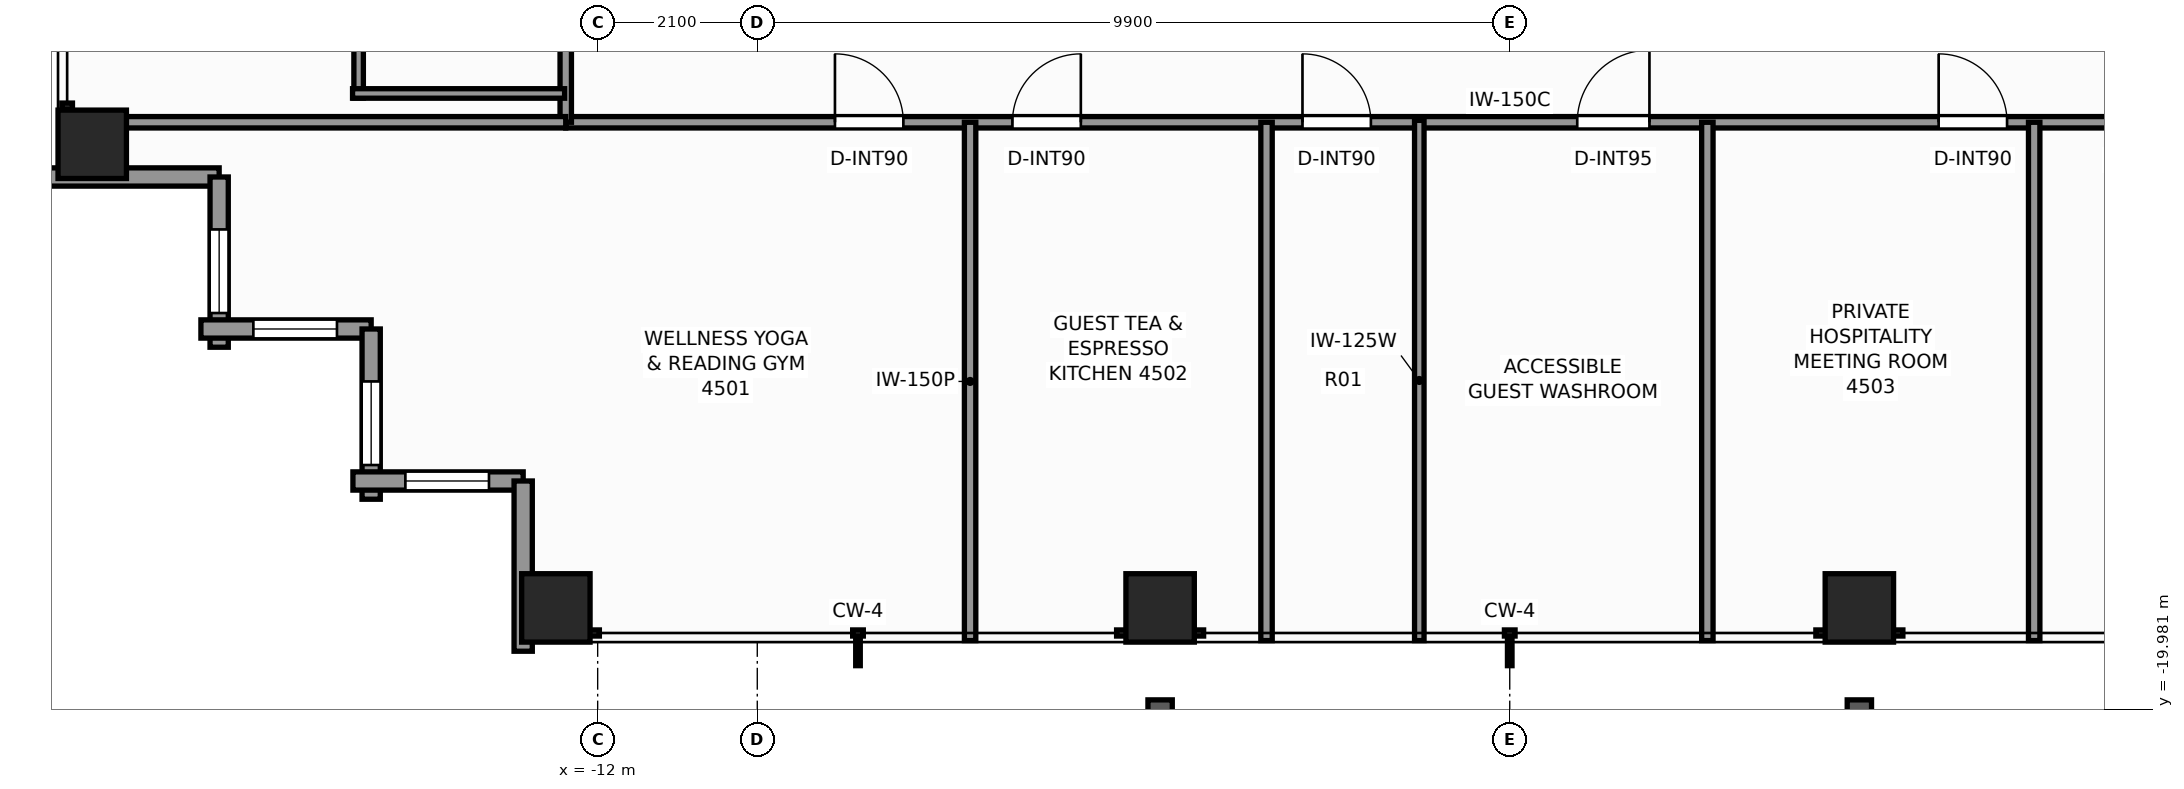
"""IFC4 building model, lengths in metres.
Left out: names, types, materials, properties, quantities, classifications, styles, units other than length and angle.
Written with IfcOpenShell. Run it as: python <this file> out.ifc"""

import sys

from ifc_helpers import new_model, si_unit, direction, frame, frame_2d, origin, origin_2d, place, context, subcontext, project, spatial, rectangle, extrude, element, fill, save


model = new_model("IFC4")
c1 = context("Model", 3, precision=1e-05, world=origin(), true_north=direction((0.0, 1.0)))
c2 = subcontext(c1, "Body", "Model", "MODEL_VIEW")
j1 = project(units=[si_unit("LENGTHUNIT", "METRE"), si_unit("PLANEANGLEUNIT", "RADIAN")], contexts=[c1])
p1 = place(None, origin())
s1 = spatial("IfcSite", under=j1, at=p1, CompositionType="ELEMENT")
p2 = place(p1, origin())
s2 = spatial("IfcBuilding", under=s1, at=p2, CompositionType="ELEMENT")
p3 = place(p2, frame((0.0, 0.0, 156.9)))
s3 = spatial("IfcBuildingStorey", under=s2, at=p3, CompositionType="ELEMENT", Elevation=156.9)
for number, where, z_axis, x_axis in (
    (1, (-12.55, -18.65, 0.0), (0.0, 0.0, 1.0), (1.0, 0.0, 0.0)),
    (2, (-4.6, -18.65, 0.0), (0.0, 0.0, 1.0), (1.0, 0.0, 0.0)),
    (3, (4.6, -18.65, 0.0), (0.0, 0.0, 1.0), (1.0, 0.0, 0.0)),
    (4, (-18.65, -12.55, 0.0), (0.0, 0.0, 1.0), (1.0, 0.0, 0.0)),
):
    element("IfcColumn", number, at=place(p3, frame(where, z_axis=z_axis, x_axis=x_axis)), inside=s3, PredefinedType="COLUMN", context=c2, shape_type="SweptSolid", body=[
        extrude(rectangle(XDim=0.9, YDim=0.9, at=origin_2d()), origin(), (0.0, 0.0, 1.0), 3.3),
    ])
p4 = place(p3, frame((-16.98, -12.98, 0.0), z_axis=(0.0, 0.0, 1.0), x_axis=(-1.0, 0.0, 0.0)))
e5 = element("IfcWall", 5, at=p4, inside=s3, PredefinedType="STANDARD", context=c2, shape_type="SweptSolid", body=[
    extrude(rectangle(XDim=2.24, YDim=0.24, at=frame_2d((1.12, 0.0))), origin(), (0.0, 0.0, 1.0), 2.483),
])
p5 = place(p3, frame((-16.98, -15.22, 0.0), z_axis=(0.0, 0.0, 1.0), x_axis=(0.0, 1.0, 0.0)))
e6 = element("IfcWall", 6, at=p5, inside=s3, PredefinedType="STANDARD", context=c2, shape_type="SweptSolid", body=[
    extrude(rectangle(XDim=2.24, YDim=0.24, at=frame_2d((1.12, 0.0))), origin(), (0.0, 0.0, 1.0), 2.483),
])
p6 = place(p5, frame((0.45, 0.0, 0.65)))
e7 = element("IfcOpeningElement", 7, at=p6, cuts=e6, PredefinedType="OPENING", context=c2, shape_type="SweptSolid", body=[
    extrude(rectangle(XDim=1.1, YDim=1.45, at=frame_2d((0.55, 0.725))), frame((0.0, 0.13, 0.0), z_axis=(0.0, -1.0, 0.0), x_axis=(1.0, 0.0, 0.0)), (0.0, 0.0, 1.0), 0.26),
])
p7 = place(p3, frame((-14.98, -14.98, 0.0), z_axis=(0.0, 0.0, 1.0), x_axis=(-1.0, 0.0, 0.0)))
e8 = element("IfcWall", 8, at=p7, inside=s3, PredefinedType="STANDARD", context=c2, shape_type="SweptSolid", body=[
    extrude(rectangle(XDim=2.24, YDim=0.24, at=frame_2d((1.12, 0.0))), origin(), (0.0, 0.0, 1.0), 2.483),
])
p8 = place(p7, frame((0.45, 0.0, 0.65)))
e9 = element("IfcOpeningElement", 9, at=p8, cuts=e8, PredefinedType="OPENING", context=c2, shape_type="SweptSolid", body=[
    extrude(rectangle(XDim=1.1, YDim=1.45, at=frame_2d((0.55, 0.725))), frame((0.0, 0.13, 0.0), z_axis=(0.0, -1.0, 0.0), x_axis=(1.0, 0.0, 0.0)), (0.0, 0.0, 1.0), 0.26),
])
p9 = place(p3, frame((-14.98, -17.22, 0.0), z_axis=(0.0, 0.0, 1.0), x_axis=(0.0, 1.0, 0.0)))
e10 = element("IfcWall", 10, at=p9, inside=s3, PredefinedType="STANDARD", context=c2, shape_type="SweptSolid", body=[
    extrude(rectangle(XDim=2.24, YDim=0.24, at=frame_2d((1.12, 0.0))), origin(), (0.0, 0.0, 1.0), 2.483),
])
p10 = place(p9, frame((0.45, 0.0, 0.65)))
e11 = element("IfcOpeningElement", 11, at=p10, cuts=e10, PredefinedType="OPENING", context=c2, shape_type="SweptSolid", body=[
    extrude(rectangle(XDim=1.1, YDim=1.45, at=frame_2d((0.55, 0.725))), frame((0.0, 0.13, 0.0), z_axis=(0.0, -1.0, 0.0), x_axis=(1.0, 0.0, 0.0)), (0.0, 0.0, 1.0), 0.26),
])
p11 = place(p3, frame((-12.98, -16.98, 0.0), z_axis=(0.0, 0.0, 1.0), x_axis=(-1.0, 0.0, 0.0)))
e12 = element("IfcWall", 12, at=p11, inside=s3, PredefinedType="STANDARD", context=c2, shape_type="SweptSolid", body=[
    extrude(rectangle(XDim=2.24, YDim=0.24, at=frame_2d((1.12, 0.0))), origin(), (0.0, 0.0, 1.0), 2.483),
])
p12 = place(p11, frame((0.45, 0.0, 0.65)))
e13 = element("IfcOpeningElement", 13, at=p12, cuts=e12, PredefinedType="OPENING", context=c2, shape_type="SweptSolid", body=[
    extrude(rectangle(XDim=1.1, YDim=1.45, at=frame_2d((0.55, 0.725))), frame((0.0, 0.13, 0.0), z_axis=(0.0, -1.0, 0.0), x_axis=(1.0, 0.0, 0.0)), (0.0, 0.0, 1.0), 0.26),
])
p13 = place(p3, frame((-12.98, -19.22, 0.0), z_axis=(0.0, 0.0, 1.0), x_axis=(0.0, 1.0, 0.0)))
e14 = element("IfcWall", 14, at=p13, inside=s3, PredefinedType="STANDARD", context=c2, shape_type="SweptSolid", body=[
    extrude(rectangle(XDim=2.24, YDim=0.24, at=frame_2d((1.12, 0.0))), origin(), (0.0, 0.0, 1.0), 2.483),
])
p14 = place(p3, frame((-12.42, -12.26, 0.0), z_axis=(0.0, 0.0, 1.0), x_axis=(1.0, 0.0, 0.0)))
e15 = element("IfcWall", 15, at=p14, inside=s3, PredefinedType="PARTITIONING", context=c2, shape_type="SweptSolid", body=[
    extrude(rectangle(XDim=24.84, YDim=0.15, at=frame_2d((12.42, 0.0))), origin(), (0.0, 0.0, 1.0), 2.389),
])
p15 = place(p14, frame((3.542, 0.0, 0.0)))
e16 = element("IfcOpeningElement", 16, at=p15, cuts=e15, PredefinedType="OPENING", context=c2, shape_type="SweptSolid", body=[
    extrude(rectangle(XDim=0.9, YDim=2.06, at=frame_2d((0.45, 1.03))), frame((0.0, 0.085, 0.0), z_axis=(0.0, -1.0, 0.0), x_axis=(1.0, 0.0, 0.0)), (0.0, 0.0, 1.0), 0.17),
])
p16 = place(p14, frame((5.877, 0.0, 0.0)))
e17 = element("IfcOpeningElement", 17, at=p16, cuts=e15, PredefinedType="OPENING", context=c2, shape_type="SweptSolid", body=[
    extrude(rectangle(XDim=0.9, YDim=2.06, at=frame_2d((0.45, 1.03))), frame((0.0, 0.085, 0.0), z_axis=(0.0, -1.0, 0.0), x_axis=(1.0, 0.0, 0.0)), (0.0, 0.0, 1.0), 0.17),
])
p17 = place(p14, frame((9.693, 0.0, 0.0)))
e18 = element("IfcOpeningElement", 18, at=p17, cuts=e15, PredefinedType="OPENING", context=c2, shape_type="SweptSolid", body=[
    extrude(rectangle(XDim=0.9, YDim=2.06, at=frame_2d((0.45, 1.03))), frame((0.0, 0.085, 0.0), z_axis=(0.0, -1.0, 0.0), x_axis=(1.0, 0.0, 0.0)), (0.0, 0.0, 1.0), 0.17),
])
p18 = place(p14, frame((13.308, 0.0, 0.0)))
e19 = element("IfcOpeningElement", 19, at=p18, cuts=e15, PredefinedType="OPENING", context=c2, shape_type="SweptSolid", body=[
    extrude(rectangle(XDim=0.95, YDim=2.06, at=frame_2d((0.475, 1.03))), frame((0.0, 0.085, 0.0), z_axis=(0.0, -1.0, 0.0), x_axis=(1.0, 0.0, 0.0)), (0.0, 0.0, 1.0), 0.17),
])
p19 = place(p14, frame((18.063, 0.0, 0.0)))
e20 = element("IfcOpeningElement", 20, at=p19, cuts=e15, PredefinedType="OPENING", context=c2, shape_type="SweptSolid", body=[
    extrude(rectangle(XDim=0.9, YDim=2.06, at=frame_2d((0.45, 1.03))), frame((0.0, 0.085, 0.0), z_axis=(0.0, -1.0, 0.0), x_axis=(1.0, 0.0, 0.0)), (0.0, 0.0, 1.0), 0.17),
])
p20 = place(p14, frame((20.259, 0.0, 0.0)))
e21 = element("IfcOpeningElement", 21, at=p20, cuts=e15, PredefinedType="OPENING", context=c2, shape_type="SweptSolid", body=[
    extrude(rectangle(XDim=0.95, YDim=2.06, at=frame_2d((0.475, 1.03))), frame((0.0, 0.085, 0.0), z_axis=(0.0, -1.0, 0.0), x_axis=(1.0, 0.0, 0.0)), (0.0, 0.0, 1.0), 0.17),
])
p21 = place(p3, frame((-12.42, -12.26, 0.0), z_axis=(0.0, 0.0, 1.0), x_axis=(0.0, 1.0, 0.0)))
e22 = element("IfcWall", 22, at=p21, inside=s3, PredefinedType="PARTITIONING", context=c2, shape_type="SweptSolid", body=[
    extrude(rectangle(XDim=24.84, YDim=0.15, at=frame_2d((12.42, 0.0))), origin(), (0.0, 0.0, 1.0), 2.389),
])
p22 = place(p21, frame((3.373, 0.0, 0.0)))
e23 = element("IfcOpeningElement", 23, at=p22, cuts=e22, PredefinedType="OPENING", context=c2, shape_type="SweptSolid", body=[
    extrude(rectangle(XDim=0.95, YDim=2.06, at=frame_2d((0.475, 1.03))), frame((0.0, 0.085, 0.0), z_axis=(0.0, -1.0, 0.0), x_axis=(1.0, 0.0, 0.0)), (0.0, 0.0, 1.0), 0.17),
])
p23 = place(p21, frame((8.959, 0.0, 0.0)))
e24 = element("IfcOpeningElement", 24, at=p23, cuts=e22, PredefinedType="OPENING", context=c2, shape_type="SweptSolid", body=[
    extrude(rectangle(XDim=0.95, YDim=2.06, at=frame_2d((0.475, 1.03))), frame((0.0, 0.085, 0.0), z_axis=(0.0, -1.0, 0.0), x_axis=(1.0, 0.0, 0.0)), (0.0, 0.0, 1.0), 0.17),
])
p24 = place(p21, frame((14.219, 0.0, 0.0)))
e25 = element("IfcOpeningElement", 25, at=p24, cuts=e22, PredefinedType="OPENING", context=c2, shape_type="SweptSolid", body=[
    extrude(rectangle(XDim=0.95, YDim=2.06, at=frame_2d((0.475, 1.03))), frame((0.0, 0.085, 0.0), z_axis=(0.0, -1.0, 0.0), x_axis=(1.0, 0.0, 0.0)), (0.0, 0.0, 1.0), 0.17),
])
p25 = place(p21, frame((20.117, 0.0, 0.0)))
e26 = element("IfcOpeningElement", 26, at=p25, cuts=e22, PredefinedType="OPENING", context=c2, shape_type="SweptSolid", body=[
    extrude(rectangle(XDim=0.95, YDim=2.06, at=frame_2d((0.475, 1.03))), frame((0.0, 0.085, 0.0), z_axis=(0.0, -1.0, 0.0), x_axis=(1.0, 0.0, 0.0)), (0.0, 0.0, 1.0), 0.17),
])
p26 = place(p3, frame((-19.08, -12.26, 0.0), z_axis=(0.0, 0.0, 1.0), x_axis=(1.0, 0.0, 0.0)))
e27 = element("IfcWall", 27, at=p26, inside=s3, PredefinedType="PARTITIONING", context=c2, shape_type="SweptSolid", body=[
    extrude(rectangle(XDim=6.66, YDim=0.15, at=frame_2d((3.33, 0.0))), origin(), (0.0, 0.0, 1.0), 2.389),
])
p27 = place(p3, frame((-7.1, -19.08, 0.0), z_axis=(0.0, 0.0, 1.0), x_axis=(0.0, 1.0, 0.0)))
e28 = element("IfcWall", 28, at=p27, inside=s3, PredefinedType="PARTITIONING", context=c2, shape_type="SweptSolid", body=[
    extrude(rectangle(XDim=6.82, YDim=0.15, at=frame_2d((3.41, 0.0))), origin(), (0.0, 0.0, 1.0), 2.473),
])
p28 = place(p3, frame((-3.2, -19.08, 0.0), z_axis=(0.0, 0.0, 1.0), x_axis=(0.0, 1.0, 0.0)))
e29 = element("IfcWall", 29, at=p28, inside=s3, PredefinedType="PARTITIONING", context=c2, shape_type="SweptSolid", body=[
    extrude(rectangle(XDim=6.82, YDim=0.15, at=frame_2d((3.41, 0.0))), origin(), (0.0, 0.0, 1.0), 2.389),
])
p29 = place(p3, frame((2.6, -19.08, 0.0), z_axis=(0.0, 0.0, 1.0), x_axis=(0.0, 1.0, 0.0)))
e30 = element("IfcWall", 30, at=p29, inside=s3, PredefinedType="PARTITIONING", context=c2, shape_type="SweptSolid", body=[
    extrude(rectangle(XDim=6.82, YDim=0.15, at=frame_2d((3.41, 0.0))), origin(), (0.0, 0.0, 1.0), 2.473),
])
p30 = place(p3, frame((-1.19, -19.08, 0.0), z_axis=(0.0, 0.0, 1.0), x_axis=(0.0, 1.0, 0.0)))
e31 = element("IfcWall", 31, at=p30, inside=s3, PredefinedType="PARTITIONING", context=c2, shape_type="SweptSolid", body=[
    extrude(rectangle(XDim=6.845, YDim=0.125, at=frame_2d((3.422, 0.0))), origin(), (0.0, 0.0, 1.0), 2.473),
])
p31 = place(p3, frame((6.9, -19.08, 0.0), z_axis=(0.0, 0.0, 1.0), x_axis=(0.0, 1.0, 0.0)))
e32 = element("IfcWall", 32, at=p31, inside=s3, PredefinedType="PARTITIONING", context=c2, shape_type="SweptSolid", body=[
    extrude(rectangle(XDim=6.82, YDim=0.15, at=frame_2d((3.41, 0.0))), origin(), (0.0, 0.0, 1.0), 2.473),
])
p32 = place(p3, frame((-15.145, -11.941, 0.0), z_axis=(0.0, 0.0, 1.0), x_axis=(0.0, 1.0, 0.0)))
e33 = element("IfcWall", 33, at=p32, inside=s3, PredefinedType="PARTITIONING", context=c2, shape_type="SweptSolid", body=[
    extrude(rectangle(XDim=2.37, YDim=0.125, at=frame_2d((1.185, 0.0))), origin(), (0.0, 0.0, 1.0), 2.389),
])
p33 = place(p3, frame((-15.225, -11.881, 0.0), z_axis=(0.0, 0.0, 1.0), x_axis=(1.0, 0.0, 0.0)))
e34 = element("IfcWall", 34, at=p33, inside=s3, PredefinedType="PARTITIONING", context=c2, shape_type="SweptSolid", body=[
    extrude(rectangle(XDim=2.79, YDim=0.125, at=frame_2d((1.395, 0.0))), origin(), (0.0, 0.0, 1.0), 3.1),
])
p34 = place(p6, origin())
e35 = element("IfcWindow", 35, at=p34, inside=s3, PartitioningType="SINGLE_PANEL", PredefinedType="WINDOW", context=c2, shape_type="SweptSolid", body=[
    extrude(rectangle(XDim=1.1, YDim=1.45, at=frame_2d((0.55, 0.725))), frame((0.0, 0.03, 0.0), z_axis=(0.0, -1.0, 0.0), x_axis=(1.0, 0.0, 0.0)), (0.0, 0.0, 1.0), 0.06),
])
fill(e7, e35)
p35 = place(p8, origin())
e36 = element("IfcWindow", 36, at=p35, inside=s3, PartitioningType="SINGLE_PANEL", PredefinedType="WINDOW", context=c2, shape_type="SweptSolid", body=[
    extrude(rectangle(XDim=1.1, YDim=1.45, at=frame_2d((0.55, 0.725))), frame((0.0, 0.03, 0.0), z_axis=(0.0, -1.0, 0.0), x_axis=(1.0, 0.0, 0.0)), (0.0, 0.0, 1.0), 0.06),
])
fill(e9, e36)
p36 = place(p10, origin())
e37 = element("IfcWindow", 37, at=p36, inside=s3, PartitioningType="SINGLE_PANEL", PredefinedType="WINDOW", context=c2, shape_type="SweptSolid", body=[
    extrude(rectangle(XDim=1.1, YDim=1.45, at=frame_2d((0.55, 0.725))), frame((0.0, 0.03, 0.0), z_axis=(0.0, -1.0, 0.0), x_axis=(1.0, 0.0, 0.0)), (0.0, 0.0, 1.0), 0.06),
])
fill(e11, e37)
p37 = place(p12, origin())
e38 = element("IfcWindow", 38, at=p37, inside=s3, PartitioningType="SINGLE_PANEL", PredefinedType="WINDOW", context=c2, shape_type="SweptSolid", body=[
    extrude(rectangle(XDim=1.1, YDim=1.45, at=frame_2d((0.55, 0.725))), frame((0.0, 0.03, 0.0), z_axis=(0.0, -1.0, 0.0), x_axis=(1.0, 0.0, 0.0)), (0.0, 0.0, 1.0), 0.06),
])
fill(e13, e38)
p38 = place(p15, origin())
e39 = element("IfcDoor", 39, at=p38, inside=s3, OperationType="SINGLE_SWING_LEFT", PredefinedType="DOOR", context=c2, shape_type="SweptSolid", body=[
    extrude(rectangle(XDim=0.9, YDim=2.06, at=frame_2d((0.45, 1.03))), frame((0.0, 0.025, 0.0), z_axis=(0.0, -1.0, 0.0), x_axis=(1.0, 0.0, 0.0)), (0.0, 0.0, 1.0), 0.05),
])
fill(e16, e39)
p39 = place(p16, origin())
e40 = element("IfcDoor", 40, at=p39, inside=s3, OperationType="SINGLE_SWING_RIGHT", PredefinedType="DOOR", context=c2, shape_type="SweptSolid", body=[
    extrude(rectangle(XDim=0.9, YDim=2.06, at=frame_2d((0.45, 1.03))), frame((0.0, 0.025, 0.0), z_axis=(0.0, -1.0, 0.0), x_axis=(1.0, 0.0, 0.0)), (0.0, 0.0, 1.0), 0.05),
])
fill(e17, e40)
p40 = place(p17, origin())
e41 = element("IfcDoor", 41, at=p40, inside=s3, OperationType="SINGLE_SWING_LEFT", PredefinedType="DOOR", context=c2, shape_type="SweptSolid", body=[
    extrude(rectangle(XDim=0.9, YDim=2.06, at=frame_2d((0.45, 1.03))), frame((0.0, 0.025, 0.0), z_axis=(0.0, -1.0, 0.0), x_axis=(1.0, 0.0, 0.0)), (0.0, 0.0, 1.0), 0.05),
])
fill(e18, e41)
p41 = place(p18, origin())
e42 = element("IfcDoor", 42, at=p41, inside=s3, OperationType="SINGLE_SWING_RIGHT", PredefinedType="DOOR", context=c2, shape_type="SweptSolid", body=[
    extrude(rectangle(XDim=0.95, YDim=2.06, at=frame_2d((0.475, 1.03))), frame((0.0, 0.025, 0.0), z_axis=(0.0, -1.0, 0.0), x_axis=(1.0, 0.0, 0.0)), (0.0, 0.0, 1.0), 0.05),
])
fill(e19, e42)
p42 = place(p19, origin())
e43 = element("IfcDoor", 43, at=p42, inside=s3, OperationType="SINGLE_SWING_LEFT", PredefinedType="DOOR", context=c2, shape_type="SweptSolid", body=[
    extrude(rectangle(XDim=0.9, YDim=2.06, at=frame_2d((0.45, 1.03))), frame((0.0, 0.025, 0.0), z_axis=(0.0, -1.0, 0.0), x_axis=(1.0, 0.0, 0.0)), (0.0, 0.0, 1.0), 0.05),
])
fill(e20, e43)
save(model, sys.argv[1])
